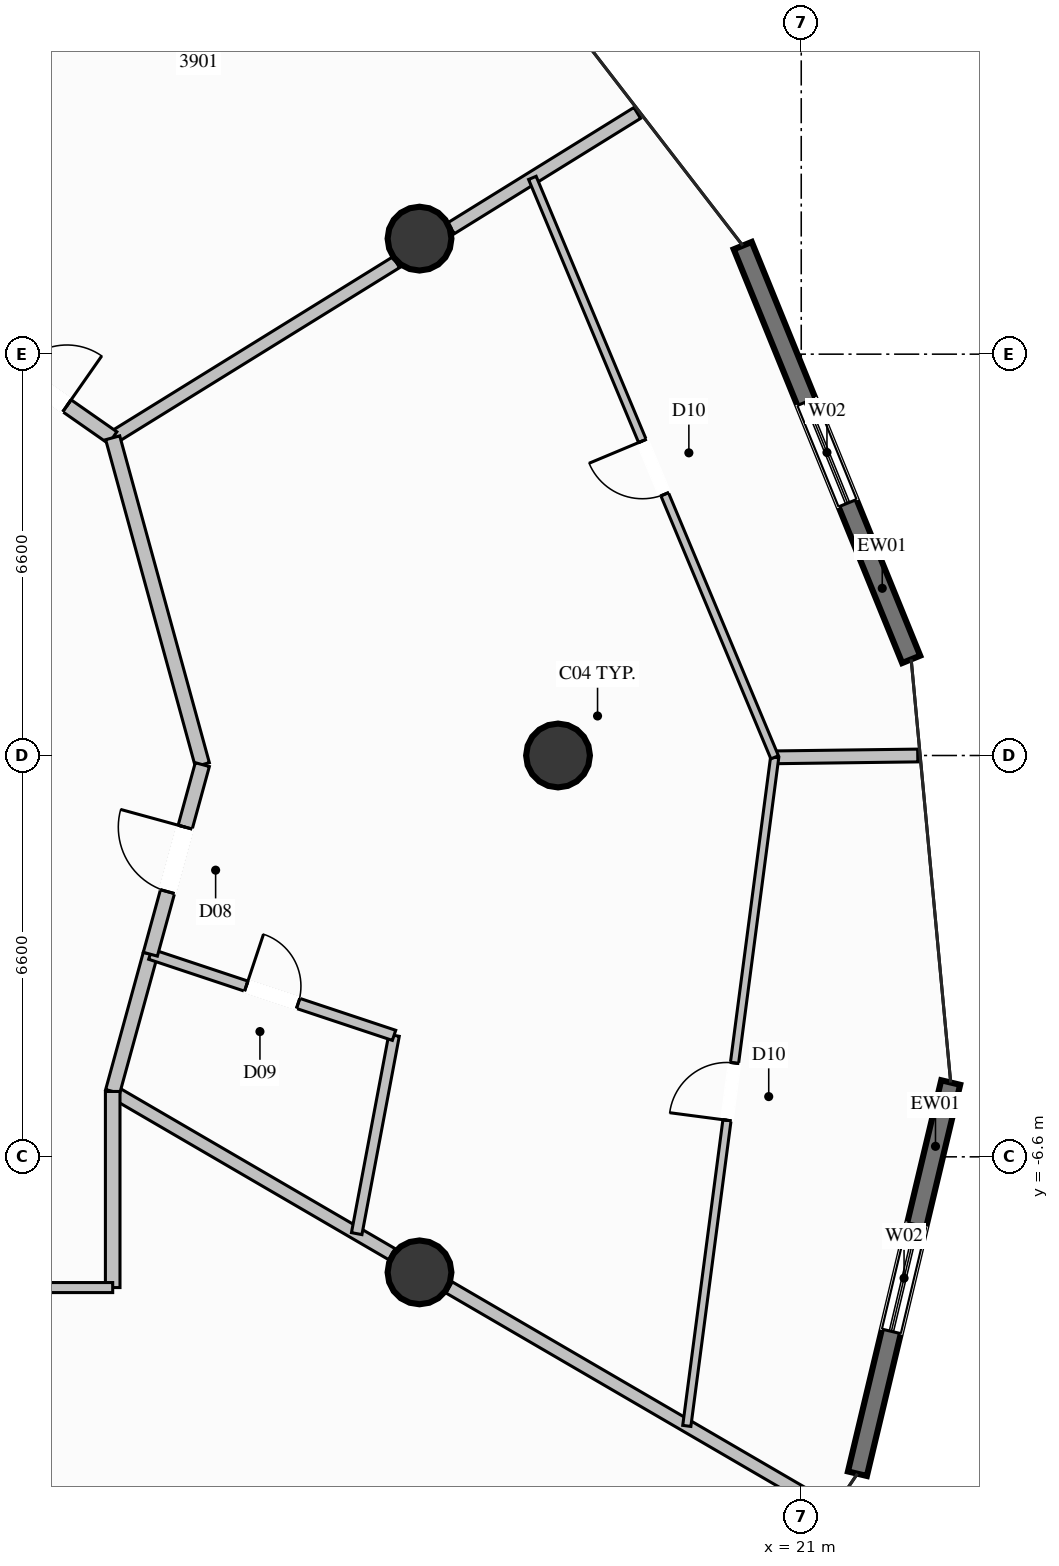
"""IFC4 building model, lengths in metres.
Left out: names, types, materials, properties, quantities, classifications, styles, units other than length and angle.
Written with IfcOpenShell. Run it as: python <this file> out.ifc"""

import sys

from ifc_helpers import new_model, si_unit, direction, frame, frame_2d, origin, origin_2d, place, context, subcontext, project, spatial, rectangle, circle, extrude, element, fill, save


model = new_model("IFC4")
c1 = context("Model", 3, precision=1e-05, world=origin(), true_north=direction((0.0, 1.0)))
c2 = subcontext(c1, "Body", "Model", "MODEL_VIEW")
j1 = project(units=[si_unit("LENGTHUNIT", "METRE"), si_unit("PLANEANGLEUNIT", "RADIAN")], contexts=[c1])
p1 = place(None, origin())
s1 = spatial("IfcSite", under=j1, at=p1, CompositionType="ELEMENT")
p2 = place(p1, origin())
s2 = spatial("IfcBuilding", under=s1, at=p2, CompositionType="ELEMENT")
p3 = place(p2, frame((0.0, 0.0, 145.8)))
s3 = spatial("IfcBuildingStorey", under=s2, at=p3, CompositionType="ELEMENT", Elevation=145.8)
for number, where, z_axis, x_axis in (
    (1, (17.0, 0.0, 0.0), (0.0, 0.0, 1.0), (1.0, 0.0, 0.0)),
    (2, (14.722, 8.5, 0.0), (0.0, 0.0, 1.0), (1.0, 0.0, 0.0)),
    (3, (14.722, -8.5, 0.0), (0.0, 0.0, 1.0), (1.0, 0.0, 0.0)),
):
    element("IfcColumn", number, at=place(p3, frame(where, z_axis=z_axis, x_axis=x_axis)), inside=s3, PredefinedType="COLUMN", context=c2, shape_type="SweptSolid", body=[
        extrude(circle(Radius=0.525, at=origin_2d()), origin(), (0.0, 0.0, 1.0), 3.6),
    ])
p4 = place(p3, frame((23.458, -5.378, 0.0), z_axis=(0.0, 0.0, 1.0), x_axis=(-0.231941586556, -0.972729716019, 0.0)))
e4 = element("IfcWall", 4, at=p4, inside=s3, PredefinedType="SOLIDWALL", context=c2, shape_type="SweptSolid", body=[
    extrude(rectangle(XDim=6.614, YDim=0.32, at=frame_2d((3.307, 0.0))), origin(), (0.0, 0.0, 1.0), 3.35),
])
p5 = place(p4, frame((2.407, 0.0, 0.35)))
e5 = element("IfcOpeningElement", 5, at=p5, cuts=e4, PredefinedType="OPENING", context=c2, shape_type="SweptSolid", body=[
    extrude(rectangle(XDim=1.8, YDim=2.6, at=frame_2d((0.9, 1.3))), frame((0.0, 0.17, 0.0), z_axis=(0.0, -1.0, 0.0), x_axis=(1.0, 0.0, 0.0)), (0.0, 0.0, 1.0), 0.34),
])
p6 = place(p3, frame((20.038, 8.385, 0.0), z_axis=(0.0, 0.0, 1.0), x_axis=(0.377067798902, -0.926185659051, 0.0)))
e6 = element("IfcWall", 6, at=p6, inside=s3, PredefinedType="SOLIDWALL", context=c2, shape_type="SweptSolid", body=[
    extrude(rectangle(XDim=7.346, YDim=0.32, at=frame_2d((3.673, 0.0))), origin(), (0.0, 0.0, 1.0), 3.35),
])
p7 = place(p6, frame((2.773, 0.0, 0.35)))
e7 = element("IfcOpeningElement", 7, at=p7, cuts=e6, PredefinedType="OPENING", context=c2, shape_type="SweptSolid", body=[
    extrude(rectangle(XDim=1.8, YDim=2.6, at=frame_2d((0.9, 1.3))), frame((0.0, 0.17, 0.0), z_axis=(0.0, -1.0, 0.0), x_axis=(1.0, 0.0, 0.0)), (0.0, 0.0, 1.0), 0.34),
])
p8 = place(p3, frame((9.676, 5.225, 0.0), z_axis=(0.0, 0.0, 1.0), x_axis=(0.850241428679, 0.526392926394, 0.0)))
e8 = element("IfcWall", 8, at=p8, inside=s3, PredefinedType="PARTITIONING", context=c2, shape_type="SweptSolid", body=[
    extrude(rectangle(XDim=5.484, YDim=0.21, at=frame_2d((2.742, 0.0))), origin(), (0.0, 0.0, 1.0), 2.791),
])
p9 = place(p3, frame((15.24, 8.67, 0.0), z_axis=(0.0, 0.0, 1.0), x_axis=(0.850161151971, 0.526522569012, 0.0)))
e9 = element("IfcWall", 9, at=p9, inside=s3, PredefinedType="PARTITIONING", context=c2, shape_type="SweptSolid", body=[
    extrude(rectangle(XDim=3.603, YDim=0.21, at=frame_2d((1.801, 0.0))), origin(), (0.0, 0.0, 1.0), 3.35),
])
p10 = place(p3, frame((9.676, -5.525, 0.0), z_axis=(0.0, 0.0, 1.0), x_axis=(0.864030429533, -0.503439586088, 0.0)))
e10 = element("IfcWall", 10, at=p10, inside=s3, PredefinedType="PARTITIONING", context=c2, shape_type="SweptSolid", body=[
    extrude(rectangle(XDim=5.313, YDim=0.21, at=frame_2d((2.657, 0.0))), origin(), (0.0, 0.0, 1.0), 2.791),
])
p11 = place(p3, frame((15.208, -8.747, 0.0), z_axis=(0.0, 0.0, 1.0), x_axis=(0.864059428721, -0.503389812808, 0.0)))
e11 = element("IfcWall", 11, at=p11, inside=s3, PredefinedType="PARTITIONING", context=c2, shape_type="SweptSolid", body=[
    extrude(rectangle(XDim=7.256, YDim=0.21, at=frame_2d((3.628, 0.0))), origin(), (0.0, 0.0, 1.0), 3.35),
])
p12 = place(p3, frame((7.35, 6.85, 0.0), z_axis=(0.0, 0.0, 1.0), x_axis=(0.819753050647, -0.57271715179, 0.0)))
e12 = element("IfcWall", 12, at=p12, inside=s3, PredefinedType="PARTITIONING", context=c2, shape_type="SweptSolid", body=[
    extrude(rectangle(XDim=2.837, YDim=0.24, at=frame_2d((1.419, 0.0))), origin(), (0.0, 0.0, 1.0), 3.35),
])
p13 = place(p12, frame((0.919, 0.0, 0.0)))
e13 = element("IfcOpeningElement", 13, at=p13, cuts=e12, PredefinedType="OPENING", context=c2, shape_type="SweptSolid", body=[
    extrude(rectangle(XDim=1.0, YDim=2.2, at=frame_2d((0.5, 1.1))), frame((0.0, 0.13, 0.0), z_axis=(0.0, -1.0, 0.0), x_axis=(1.0, 0.0, 0.0)), (0.0, 0.0, 1.0), 0.26),
])
p14 = place(p3, frame((9.676, -5.525, 0.0), z_axis=(0.0, 0.0, 1.0), x_axis=(0.264467775372, 0.964394522895, 0.0)))
e14 = element("IfcWall", 14, at=p14, inside=s3, PredefinedType="PARTITIONING", context=c2, shape_type="SweptSolid", body=[
    extrude(rectangle(XDim=2.34, YDim=0.24, at=frame_2d((1.17, 0.0))), origin(), (0.0, 0.0, 1.0), 3.35),
])
p15 = place(p3, frame((13.689, -7.863, 0.0), z_axis=(0.0, 0.0, 1.0), x_axis=(0.185039216189, 0.982731137429, 0.0)))
e15 = element("IfcWall", 15, at=p15, inside=s3, PredefinedType="PLUMBINGWALL", context=c2, shape_type="SweptSolid", body=[
    extrude(rectangle(XDim=3.318, YDim=0.175, at=frame_2d((1.659, 0.0))), origin(), (0.0, 0.0, 1.0), 3.35),
])
p16 = place(p3, frame((10.295, -3.268, 0.0), z_axis=(0.0, 0.0, 1.0), x_axis=(0.948827687615, -0.315794267231, 0.0)))
e16 = element("IfcWall", 16, at=p16, inside=s3, PredefinedType="PLUMBINGWALL", context=c2, shape_type="SweptSolid", body=[
    extrude(rectangle(XDim=4.224, YDim=0.175, at=frame_2d((2.112, 0.0))), origin(), (0.0, 0.0, 1.0), 3.35),
])
p17 = place(p16, frame((1.662, 0.0, 0.0)))
e17 = element("IfcOpeningElement", 17, at=p17, cuts=e16, PredefinedType="OPENING", context=c2, shape_type="SweptSolid", body=[
    extrude(rectangle(XDim=0.9, YDim=2.1, at=frame_2d((0.45, 1.05))), frame((0.0, 0.098, 0.0), z_axis=(0.0, -1.0, 0.0), x_axis=(1.0, 0.0, 0.0)), (0.0, 0.0, 1.0), 0.195),
])
p18 = place(p3, frame((20.563, -0.03, 0.0), z_axis=(0.0, 0.0, 1.0), x_axis=(0.99991857583, 0.01276094468, 0.0)))
e18 = element("IfcWall", 18, at=p18, inside=s3, PredefinedType="PARTITIONING", context=c2, shape_type="SweptSolid", body=[
    extrude(rectangle(XDim=2.353, YDim=0.21, at=frame_2d((1.177, 0.0))), origin(), (0.0, 0.0, 1.0), 3.35),
])
p19 = place(p3, frame((11.15, -0.15, 0.0), z_axis=(0.0, 0.0, 1.0), x_axis=(-0.264447801629, 0.964400000111, 0.0)))
e19 = element("IfcWall", 19, at=p19, inside=s3, PredefinedType="PARTITIONING", context=c2, shape_type="SweptSolid", body=[
    extrude(rectangle(XDim=5.573, YDim=0.24, at=frame_2d((2.787, 0.0))), origin(), (0.0, 0.0, 1.0), 2.985),
])
p20 = place(p3, frame((10.295, -3.268, 0.0), z_axis=(0.0, 0.0, 1.0), x_axis=(0.264433345006, 0.96440396414, 0.0)))
e20 = element("IfcWall", 20, at=p20, inside=s3, PredefinedType="PARTITIONING", context=c2, shape_type="SweptSolid", body=[
    extrude(rectangle(XDim=3.233, YDim=0.24, at=frame_2d((1.617, 0.0))), origin(), (0.0, 0.0, 1.0), 2.985),
])
p21 = place(p20, frame((1.067, 0.0, 0.0)))
e21 = element("IfcOpeningElement", 21, at=p21, cuts=e20, PredefinedType="OPENING", context=c2, shape_type="SweptSolid", body=[
    extrude(rectangle(XDim=1.1, YDim=2.3, at=frame_2d((0.55, 1.15))), frame((0.0, 0.13, 0.0), z_axis=(0.0, -1.0, 0.0), x_axis=(1.0, 0.0, 0.0)), (0.0, 0.0, 1.0), 0.26),
])
p22 = place(p3, frame((19.118, -11.025, 0.0), z_axis=(0.0, 0.0, 1.0), x_axis=(0.130310428057, 0.991473243381, 0.0)))
e22 = element("IfcWall", 22, at=p22, inside=s3, PredefinedType="PARTITIONING", context=c2, shape_type="SweptSolid", body=[
    extrude(rectangle(XDim=11.089, YDim=0.135, at=frame_2d((5.545, 0.0))), origin(), (0.0, 0.0, 1.0), 3.35),
])
p23 = place(p22, frame((5.07, 0.0, 0.0)))
e23 = element("IfcOpeningElement", 23, at=p23, cuts=e22, PredefinedType="OPENING", context=c2, shape_type="SweptSolid", body=[
    extrude(rectangle(XDim=0.95, YDim=2.1, at=frame_2d((0.475, 1.05))), frame((0.0, 0.078, 0.0), z_axis=(0.0, -1.0, 0.0), x_axis=(1.0, 0.0, 0.0)), (0.0, 0.0, 1.0), 0.155),
])
p24 = place(p3, frame((20.563, -0.03, 0.0), z_axis=(0.0, 0.0, 1.0), x_axis=(-0.385825151615, 0.922571922606, 0.0)))
e24 = element("IfcWall", 24, at=p24, inside=s3, PredefinedType="PARTITIONING", context=c2, shape_type="SweptSolid", body=[
    extrude(rectangle(XDim=10.329, YDim=0.135, at=frame_2d((5.165, 0.0))), origin(), (0.0, 0.0, 1.0), 3.35),
])
p25 = place(p24, frame((4.689, 0.0, 0.0)))
e25 = element("IfcOpeningElement", 25, at=p25, cuts=e24, PredefinedType="OPENING", context=c2, shape_type="SweptSolid", body=[
    extrude(rectangle(XDim=0.95, YDim=2.1, at=frame_2d((0.475, 1.05))), frame((0.0, 0.078, 0.0), z_axis=(0.0, -1.0, 0.0), x_axis=(1.0, 0.0, 0.0)), (0.0, 0.0, 1.0), 0.155),
])
p26 = place(p3, frame((5.612, -8.75, 0.0), z_axis=(0.0, 0.0, 1.0), x_axis=(0.62188276913, -0.783110350755, 0.0)))
e26 = element("IfcWall", 26, at=p26, inside=s3, PredefinedType="PARTITIONING", context=c2, shape_type="SweptSolid", body=[
    extrude(rectangle(XDim=14.08, YDim=0.21, at=frame_2d((7.04, 0.0))), origin(), (0.0, 0.0, 1.0), 3.35),
])
p27 = place(p3, frame((9.676, -8.75, 0.0), z_axis=(0.0, 0.0, 1.0), x_axis=(0.0, 1.0, 0.0)))
e27 = element("IfcWall", 27, at=p27, inside=s3, PredefinedType="PARTITIONING", context=c2, shape_type="SweptSolid", body=[
    extrude(rectangle(XDim=3.225, YDim=0.24, at=frame_2d((1.613, 0.0))), origin(), (0.0, 0.0, 1.0), 3.35),
])
p28 = place(p3, frame((5.612, -8.75, 0.0), z_axis=(0.0, 0.0, 1.0), x_axis=(1.0, 0.0, 0.0)))
e28 = element("IfcWall", 28, at=p28, inside=s3, PredefinedType="PARTITIONING", context=c2, shape_type="SweptSolid", body=[
    extrude(rectangle(XDim=4.064, YDim=0.165, at=frame_2d((2.032, 0.0))), origin(), (0.0, 0.0, 1.0), 3.35),
])
p29 = place(p28, frame((1.557, 0.0, 0.0)))
e29 = element("IfcOpeningElement", 29, at=p29, cuts=e28, PredefinedType="OPENING", context=c2, shape_type="SweptSolid", body=[
    extrude(rectangle(XDim=0.95, YDim=2.1, at=frame_2d((0.475, 1.05))), frame((0.0, 0.093, 0.0), z_axis=(0.0, -1.0, 0.0), x_axis=(1.0, 0.0, 0.0)), (0.0, 0.0, 1.0), 0.185),
])
p30 = place(p5, origin())
e30 = element("IfcWindow", 30, at=p30, inside=s3, PartitioningType="SINGLE_PANEL", PredefinedType="WINDOW", context=c2, shape_type="SweptSolid", body=[
    extrude(rectangle(XDim=1.8, YDim=2.6, at=frame_2d((0.9, 1.3))), frame((0.0, 0.03, 0.0), z_axis=(0.0, -1.0, 0.0), x_axis=(1.0, 0.0, 0.0)), (0.0, 0.0, 1.0), 0.06),
])
fill(e5, e30)
p31 = place(p7, origin())
e31 = element("IfcWindow", 31, at=p31, inside=s3, PartitioningType="SINGLE_PANEL", PredefinedType="WINDOW", context=c2, shape_type="SweptSolid", body=[
    extrude(rectangle(XDim=1.8, YDim=2.6, at=frame_2d((0.9, 1.3))), frame((0.0, 0.03, 0.0), z_axis=(0.0, -1.0, 0.0), x_axis=(1.0, 0.0, 0.0)), (0.0, 0.0, 1.0), 0.06),
])
fill(e7, e31)
p32 = place(p13, origin())
e32 = element("IfcDoor", 32, at=p32, inside=s3, OperationType="SINGLE_SWING_RIGHT", PredefinedType="DOOR", context=c2, shape_type="SweptSolid", body=[
    extrude(rectangle(XDim=1.0, YDim=2.2, at=frame_2d((0.5, 1.1))), frame((0.0, 0.025, 0.0), z_axis=(0.0, -1.0, 0.0), x_axis=(1.0, 0.0, 0.0)), (0.0, 0.0, 1.0), 0.05),
])
fill(e13, e32)
p33 = place(p17, origin())
e33 = element("IfcDoor", 33, at=p33, inside=s3, OperationType="SINGLE_SWING_LEFT", PredefinedType="DOOR", context=c2, shape_type="SweptSolid", body=[
    extrude(rectangle(XDim=0.9, YDim=2.1, at=frame_2d((0.45, 1.05))), frame((0.0, 0.025, 0.0), z_axis=(0.0, -1.0, 0.0), x_axis=(1.0, 0.0, 0.0)), (0.0, 0.0, 1.0), 0.05),
])
fill(e17, e33)
p34 = place(p21, origin())
e34 = element("IfcDoor", 34, at=p34, inside=s3, OperationType="SINGLE_SWING_RIGHT", PredefinedType="DOOR", context=c2, shape_type="SweptSolid", body=[
    extrude(rectangle(XDim=1.1, YDim=2.3, at=frame_2d((0.55, 1.15))), frame((0.0, 0.025, 0.0), z_axis=(0.0, -1.0, 0.0), x_axis=(1.0, 0.0, 0.0)), (0.0, 0.0, 1.0), 0.05),
])
fill(e21, e34)
p35 = place(p23, origin())
e35 = element("IfcDoor", 35, at=p35, inside=s3, OperationType="SINGLE_SWING_LEFT", PredefinedType="DOOR", context=c2, shape_type="SweptSolid", body=[
    extrude(rectangle(XDim=0.95, YDim=2.1, at=frame_2d((0.475, 1.05))), frame((0.0, 0.025, 0.0), z_axis=(0.0, -1.0, 0.0), x_axis=(1.0, 0.0, 0.0)), (0.0, 0.0, 1.0), 0.05),
])
fill(e23, e35)
p36 = place(p25, origin())
e36 = element("IfcDoor", 36, at=p36, inside=s3, OperationType="SINGLE_SWING_RIGHT", PredefinedType="DOOR", context=c2, shape_type="SweptSolid", body=[
    extrude(rectangle(XDim=0.95, YDim=2.1, at=frame_2d((0.475, 1.05))), frame((0.0, 0.025, 0.0), z_axis=(0.0, -1.0, 0.0), x_axis=(1.0, 0.0, 0.0)), (0.0, 0.0, 1.0), 0.05),
])
fill(e25, e36)
save(model, sys.argv[1])
